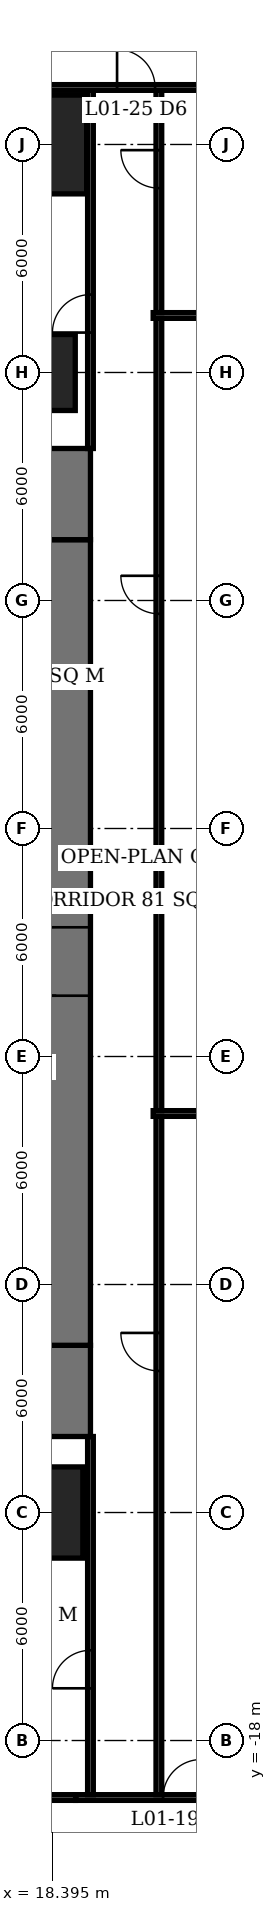
"""IFC4 building model, lengths in metres.
Left out: names, types, materials, properties, quantities, classifications, styles, units other than length and angle.
Written with IfcOpenShell. Run it as: python <this file> out.ifc"""

import sys

from ifc_helpers import new_model, si_unit, direction, frame, frame_2d, origin, origin_2d, place, context, subcontext, project, spatial, rectangle, extrude, element, fill, save


model = new_model("IFC4")
c1 = context("Model", 3, precision=1e-05, world=origin(), true_north=direction((0.0, 1.0)))
c2 = subcontext(c1, "Body", "Model", "MODEL_VIEW")
j1 = project(units=[si_unit("LENGTHUNIT", "METRE"), si_unit("PLANEANGLEUNIT", "RADIAN")], contexts=[c1])
p1 = place(None, origin())
s1 = spatial("IfcSite", under=j1, at=p1, CompositionType="ELEMENT")
p2 = place(p1, origin())
s2 = spatial("IfcBuilding", under=s1, at=p2, CompositionType="ELEMENT")
p3 = place(p2, frame((0.0, 0.0, 6.0)))
s3 = spatial("IfcBuildingStorey", under=s2, at=p3, CompositionType="ELEMENT", Elevation=6.0)
p4 = place(p3, frame((18.0, -12.0, 0.0), z_axis=(0.0, 0.0, 1.0), x_axis=(1.0, 0.0, 0.0)))
e1 = element("IfcColumn", 1, at=p4, inside=s3, PredefinedType="COLUMN", context=c2, shape_type="SweptSolid", body=[
    extrude(rectangle(XDim=2.4, YDim=2.4, at=origin_2d()), origin(), (0.0, 0.0, 1.0), 5.0),
])
p5 = place(p3, frame((18.0, 18.0, 0.0), z_axis=(0.0, 0.0, 1.0), x_axis=(1.0, 0.0, 0.0)))
e2 = element("IfcColumn", 2, at=p5, inside=s3, PredefinedType="COLUMN", context=c2, shape_type="SweptSolid", body=[
    extrude(rectangle(XDim=2.0, YDim=2.0, at=origin_2d()), origin(), (0.0, 0.0, 1.0), 5.0),
])
p6 = place(p3, frame((18.0, 24.0, 0.0), z_axis=(0.0, 0.0, 1.0), x_axis=(1.0, 0.0, 0.0)))
e3 = element("IfcColumn", 3, at=p6, inside=s3, PredefinedType="COLUMN", context=c2, shape_type="SweptSolid", body=[
    extrude(rectangle(XDim=2.6, YDim=2.6, at=origin_2d()), origin(), (0.0, 0.0, 1.0), 5.0),
])
p7 = place(p3, frame((18.5, -7.6, 0.0), z_axis=(0.0, 0.0, 1.0), x_axis=(0.0, 1.0, 0.0)))
e4 = element("IfcWall", 4, at=p7, inside=s3, PredefinedType="SHEAR", context=c2, shape_type="SweptSolid", body=[
    extrude(rectangle(XDim=21.2, YDim=1.8, at=frame_2d((10.6, 0.0))), origin(), (0.0, 0.0, 1.0), 5.0),
])
p8 = place(p7, frame((9.2, 0.0, 0.0)))
e5 = element("IfcOpeningElement", 5, at=p8, cuts=e4, PredefinedType="OPENING", context=c2, shape_type="SweptSolid", body=[
    extrude(rectangle(XDim=1.8, YDim=2.4, at=frame_2d((0.9, 1.2))), frame((0.0, 0.91, 0.0), z_axis=(0.0, -1.0, 0.0), x_axis=(1.0, 0.0, 0.0)), (0.0, 0.0, 1.0), 1.82),
])
for number, where, z_axis, x_axis in (
    (6, (18.5, -10.0, 0.0), (0.0, 0.0, 1.0), (0.0, 1.0, 0.0)),
    (7, (18.5, 13.6, 0.0), (0.0, 0.0, 1.0), (0.0, 1.0, 0.0)),
):
    element("IfcWall", number, at=place(p3, frame(where, z_axis=z_axis, x_axis=x_axis)), inside=s3, PredefinedType="SHEAR", context=c2, shape_type="SweptSolid", body=[
        extrude(rectangle(XDim=2.4, YDim=1.8, at=frame_2d((1.2, 0.0))), origin(), (0.0, 0.0, 1.0), 5.0),
    ])
p9 = place(p3, frame((18.0, -19.5, 0.0), z_axis=(0.0, 0.0, 1.0), x_axis=(1.0, 0.0, 0.0)))
e8 = element("IfcWall", 8, at=p9, inside=s3, PredefinedType="PARTITIONING", context=c2, shape_type="SweptSolid", body=[
    extrude(rectangle(XDim=1.01, YDim=0.15, at=frame_2d((0.505, 0.0))), origin(), (0.0, 0.0, 1.0), 3.75),
])
p10 = place(p3, frame((19.01, -19.5, 0.0), z_axis=(0.0, 0.0, 1.0), x_axis=(1.0, 0.0, 0.0)))
e9 = element("IfcWall", 9, at=p10, inside=s3, PredefinedType="PARTITIONING", context=c2, shape_type="SweptSolid", body=[
    extrude(rectangle(XDim=4.915, YDim=0.15, at=frame_2d((2.458, 0.0))), origin(), (0.0, 0.0, 1.0), 4.75),
])
p11 = place(p10, frame((2.3, 0.0, 0.0)))
e10 = element("IfcOpeningElement", 10, at=p11, cuts=e9, PredefinedType="OPENING", context=c2, shape_type="SweptSolid", body=[
    extrude(rectangle(XDim=1.0, YDim=2.1, at=frame_2d((0.5, 1.05))), frame((0.0, 0.085, 0.0), z_axis=(0.0, -1.0, 0.0), x_axis=(1.0, 0.0, 0.0)), (0.0, 0.0, 1.0), 0.17),
])
p12 = place(p3, frame((18.075, 25.5, 0.0), z_axis=(0.0, 0.0, 1.0), x_axis=(1.0, 0.0, 0.0)))
e11 = element("IfcWall", 11, at=p12, inside=s3, PredefinedType="PARTITIONING", context=c2, shape_type="SweptSolid", body=[
    extrude(rectangle(XDim=5.85, YDim=0.15, at=frame_2d((2.925, 0.0))), origin(), (0.0, 0.0, 1.0), 4.75),
])
p13 = place(p12, frame((2.025, 0.0, 0.0)))
e12 = element("IfcOpeningElement", 12, at=p13, cuts=e11, PredefinedType="OPENING", context=c2, shape_type="SweptSolid", body=[
    extrude(rectangle(XDim=1.0, YDim=2.1, at=frame_2d((0.5, 1.05))), frame((0.0, 0.085, 0.0), z_axis=(0.0, -1.0, 0.0), x_axis=(1.0, 0.0, 0.0)), (0.0, 0.0, 1.0), 0.17),
])
p14 = place(p3, frame((19.4, -19.425, 0.0), z_axis=(0.0, 0.0, 1.0), x_axis=(0.0, 1.0, 0.0)))
e13 = element("IfcWall", 13, at=p14, inside=s3, PredefinedType="PARTITIONING", context=c2, shape_type="SweptSolid", body=[
    extrude(rectangle(XDim=9.425, YDim=0.15, at=frame_2d((4.712, 0.0))), origin(), (0.0, 0.0, 1.0), 4.75),
])
p15 = place(p14, frame((2.799, 0.0, 0.0)))
e14 = element("IfcOpeningElement", 14, at=p15, cuts=e13, PredefinedType="OPENING", context=c2, shape_type="SweptSolid", body=[
    extrude(rectangle(XDim=1.0, YDim=2.1, at=frame_2d((0.5, 1.05))), frame((0.0, 0.085, 0.0), z_axis=(0.0, -1.0, 0.0), x_axis=(1.0, 0.0, 0.0)), (0.0, 0.0, 1.0), 0.17),
])
p16 = place(p3, frame((19.4, 16.0, 0.0), z_axis=(0.0, 0.0, 1.0), x_axis=(0.0, 1.0, 0.0)))
e15 = element("IfcWall", 15, at=p16, inside=s3, PredefinedType="PARTITIONING", context=c2, shape_type="SweptSolid", body=[
    extrude(rectangle(XDim=9.425, YDim=0.15, at=frame_2d((4.712, 0.0))), origin(), (0.0, 0.0, 1.0), 4.75),
])
p17 = place(p16, frame((3.05, 0.0, 0.0)))
e16 = element("IfcOpeningElement", 16, at=p17, cuts=e15, PredefinedType="OPENING", context=c2, shape_type="SweptSolid", body=[
    extrude(rectangle(XDim=1.0, YDim=2.1, at=frame_2d((0.5, 1.05))), frame((0.0, 0.085, 0.0), z_axis=(0.0, -1.0, 0.0), x_axis=(1.0, 0.0, 0.0)), (0.0, 0.0, 1.0), 0.17),
])
p18 = place(p3, frame((21.2, -19.425, 0.0), z_axis=(0.0, 0.0, 1.0), x_axis=(0.0, 1.0, 0.0)))
e17 = element("IfcWall", 17, at=p18, inside=s3, PredefinedType="PARTITIONING", context=c2, shape_type="SweptSolid", body=[
    extrude(rectangle(XDim=17.85, YDim=0.15, at=frame_2d((8.925, 0.0))), origin(), (0.0, 0.0, 1.0), 4.75),
])
p19 = place(p18, frame((11.151, 0.0, 0.0)))
e18 = element("IfcOpeningElement", 18, at=p19, cuts=e17, PredefinedType="OPENING", context=c2, shape_type="SweptSolid", body=[
    extrude(rectangle(XDim=1.0, YDim=2.1, at=frame_2d((0.5, 1.05))), frame((0.0, 0.085, 0.0), z_axis=(0.0, -1.0, 0.0), x_axis=(1.0, 0.0, 0.0)), (0.0, 0.0, 1.0), 0.17),
])
p20 = place(p3, frame((21.2, -1.425, 0.0), z_axis=(0.0, 0.0, 1.0), x_axis=(0.0, 1.0, 0.0)))
e19 = element("IfcWall", 19, at=p20, inside=s3, PredefinedType="PARTITIONING", context=c2, shape_type="SweptSolid", body=[
    extrude(rectangle(XDim=20.85, YDim=0.15, at=frame_2d((10.425, 0.0))), origin(), (0.0, 0.0, 1.0), 4.75),
])
p21 = place(p20, frame((13.075, 0.0, 0.0)))
e20 = element("IfcOpeningElement", 20, at=p21, cuts=e19, PredefinedType="OPENING", context=c2, shape_type="SweptSolid", body=[
    extrude(rectangle(XDim=1.0, YDim=2.1, at=frame_2d((0.5, 1.05))), frame((0.0, 0.085, 0.0), z_axis=(0.0, -1.0, 0.0), x_axis=(1.0, 0.0, 0.0)), (0.0, 0.0, 1.0), 0.17),
])
p22 = place(p3, frame((21.05, -1.5, 0.0), z_axis=(0.0, 0.0, 1.0), x_axis=(1.0, 0.0, 0.0)))
e21 = element("IfcWall", 21, at=p22, inside=s3, PredefinedType="PARTITIONING", context=c2, shape_type="SweptSolid", body=[
    extrude(rectangle(XDim=2.875, YDim=0.15, at=frame_2d((1.438, 0.0))), origin(), (0.0, 0.0, 1.0), 4.75),
])
p23 = place(p3, frame((21.2, 19.575, 0.0), z_axis=(0.0, 0.0, 1.0), x_axis=(0.0, 1.0, 0.0)))
e22 = element("IfcWall", 22, at=p23, inside=s3, PredefinedType="PARTITIONING", context=c2, shape_type="SweptSolid", body=[
    extrude(rectangle(XDim=5.85, YDim=0.15, at=frame_2d((2.925, 0.0))), origin(), (0.0, 0.0, 1.0), 4.75),
])
p24 = place(p23, frame((3.276, 0.0, 0.0)))
e23 = element("IfcOpeningElement", 23, at=p24, cuts=e22, PredefinedType="OPENING", context=c2, shape_type="SweptSolid", body=[
    extrude(rectangle(XDim=1.0, YDim=2.1, at=frame_2d((0.5, 1.05))), frame((0.0, 0.085, 0.0), z_axis=(0.0, -1.0, 0.0), x_axis=(1.0, 0.0, 0.0)), (0.0, 0.0, 1.0), 0.17),
])
p25 = place(p3, frame((21.05, 19.5, 0.0), z_axis=(0.0, 0.0, 1.0), x_axis=(1.0, 0.0, 0.0)))
e24 = element("IfcWall", 24, at=p25, inside=s3, PredefinedType="PARTITIONING", context=c2, shape_type="SweptSolid", body=[
    extrude(rectangle(XDim=16.325, YDim=0.15, at=frame_2d((8.163, 0.0))), origin(), (0.0, 0.0, 1.0), 4.75),
])
p26 = place(p8, origin())
e25 = element("IfcDoor", 25, at=p26, inside=s3, OperationType="DOUBLE_DOOR_SINGLE_SWING", PredefinedType="DOOR", context=c2, shape_type="SweptSolid", body=[
    extrude(rectangle(XDim=1.8, YDim=2.4, at=frame_2d((0.9, 1.2))), frame((0.0, 0.025, 0.0), z_axis=(0.0, -1.0, 0.0), x_axis=(1.0, 0.0, 0.0)), (0.0, 0.0, 1.0), 0.05),
])
fill(e5, e25)
p27 = place(p11, origin())
e26 = element("IfcDoor", 26, at=p27, inside=s3, OperationType="SINGLE_SWING_RIGHT", PredefinedType="DOOR", context=c2, shape_type="SweptSolid", body=[
    extrude(rectangle(XDim=1.0, YDim=2.1, at=frame_2d((0.5, 1.05))), frame((0.0, 0.025, 0.0), z_axis=(0.0, -1.0, 0.0), x_axis=(1.0, 0.0, 0.0)), (0.0, 0.0, 1.0), 0.05),
])
fill(e10, e26)
p28 = place(p13, origin())
e27 = element("IfcDoor", 27, at=p28, inside=s3, OperationType="SINGLE_SWING_LEFT", PredefinedType="DOOR", context=c2, shape_type="SweptSolid", body=[
    extrude(rectangle(XDim=1.0, YDim=2.1, at=frame_2d((0.5, 1.05))), frame((0.0, 0.025, 0.0), z_axis=(0.0, -1.0, 0.0), x_axis=(1.0, 0.0, 0.0)), (0.0, 0.0, 1.0), 0.05),
])
fill(e12, e27)
p29 = place(p19, origin())
e28 = element("IfcDoor", 28, at=p29, inside=s3, OperationType="SINGLE_SWING_RIGHT", PredefinedType="DOOR", context=c2, shape_type="SweptSolid", body=[
    extrude(rectangle(XDim=1.0, YDim=2.1, at=frame_2d((0.5, 1.05))), frame((0.0, 0.025, 0.0), z_axis=(0.0, -1.0, 0.0), x_axis=(1.0, 0.0, 0.0)), (0.0, 0.0, 1.0), 0.05),
])
fill(e18, e28)
p30 = place(p15, origin())
e29 = element("IfcDoor", 29, at=p30, inside=s3, OperationType="SINGLE_SWING_LEFT", PredefinedType="DOOR", context=c2, shape_type="SweptSolid", body=[
    extrude(rectangle(XDim=1.0, YDim=2.1, at=frame_2d((0.5, 1.05))), frame((0.0, 0.025, 0.0), z_axis=(0.0, -1.0, 0.0), x_axis=(1.0, 0.0, 0.0)), (0.0, 0.0, 1.0), 0.05),
])
fill(e14, e29)
p31 = place(p21, origin())
e30 = element("IfcDoor", 30, at=p31, inside=s3, OperationType="SINGLE_SWING_RIGHT", PredefinedType="DOOR", context=c2, shape_type="SweptSolid", body=[
    extrude(rectangle(XDim=1.0, YDim=2.1, at=frame_2d((0.5, 1.05))), frame((0.0, 0.025, 0.0), z_axis=(0.0, -1.0, 0.0), x_axis=(1.0, 0.0, 0.0)), (0.0, 0.0, 1.0), 0.05),
])
fill(e20, e30)
p32 = place(p17, origin())
e31 = element("IfcDoor", 31, at=p32, inside=s3, OperationType="SINGLE_SWING_LEFT", PredefinedType="DOOR", context=c2, shape_type="SweptSolid", body=[
    extrude(rectangle(XDim=1.0, YDim=2.1, at=frame_2d((0.5, 1.05))), frame((0.0, 0.025, 0.0), z_axis=(0.0, -1.0, 0.0), x_axis=(1.0, 0.0, 0.0)), (0.0, 0.0, 1.0), 0.05),
])
fill(e16, e31)
p33 = place(p24, origin())
e32 = element("IfcDoor", 32, at=p33, inside=s3, OperationType="SINGLE_SWING_RIGHT", PredefinedType="DOOR", context=c2, shape_type="SweptSolid", body=[
    extrude(rectangle(XDim=1.0, YDim=2.1, at=frame_2d((0.5, 1.05))), frame((0.0, 0.025, 0.0), z_axis=(0.0, -1.0, 0.0), x_axis=(1.0, 0.0, 0.0)), (0.0, 0.0, 1.0), 0.05),
])
fill(e23, e32)
save(model, sys.argv[1])
